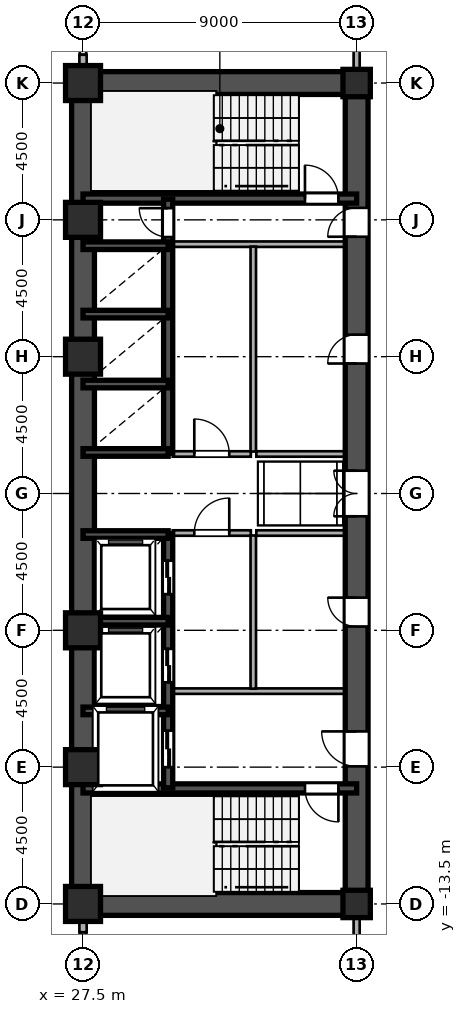
"""IFC4 building model, lengths in metres.
Left out: names, types, materials, properties, quantities, classifications, styles, units other than length and angle.
Written with IfcOpenShell. Run it as: python <this file> out.ifc"""

import sys

from ifc_helpers import new_model, si_unit, direction, frame, frame_2d, origin, origin_2d, place, context, subcontext, project, spatial, rectangle, hollow_rectangle, i_section, extrude, source, transform, mapped, element, fill, save


model = new_model("IFC4")
c1 = context("Model", 3, precision=1e-05, world=origin(), true_north=direction((0.0, 1.0)))
c2 = subcontext(c1, "Body", "Model", "MODEL_VIEW")
j1 = project(units=[si_unit("LENGTHUNIT", "METRE"), si_unit("PLANEANGLEUNIT", "RADIAN")], contexts=[c1])
p1 = place(None, origin())
s1 = spatial("IfcSite", under=j1, at=p1, CompositionType="ELEMENT")
p2 = place(p1, origin())
s2 = spatial("IfcBuilding", under=s1, at=p2, CompositionType="ELEMENT")
p3 = place(p2, frame((0.0, 0.0, 44.1)))
s3 = spatial("IfcBuildingStorey", under=s2, at=p3, CompositionType="ELEMENT", Elevation=44.1)
m1 = source(origin(), c2, "Body", "SweptSolid", [
    extrude(hollow_rectangle(XDim=1.15, YDim=1.15, WallThickness=0.048, at=origin_2d()), origin(), (0.0, 0.0, 1.0), 3.6),
])
for number, where, z_axis, x_axis in (
    (1, (27.5, -13.5, 0.0), (0.0, 0.0, 1.0), (1.0, 0.0, 0.0)),
    (2, (27.5, -9.0, 0.0), (0.0, 0.0, 1.0), (1.0, 0.0, 0.0)),
    (3, (27.5, -4.5, 0.0), (0.0, 0.0, 1.0), (1.0, 0.0, 0.0)),
    (4, (27.5, 4.5, 0.0), (0.0, 0.0, 1.0), (1.0, 0.0, 0.0)),
    (5, (27.5, 9.0, 0.0), (0.0, 0.0, 1.0), (1.0, 0.0, 0.0)),
    (6, (27.5, 13.5, 0.0), (0.0, 0.0, 1.0), (1.0, 0.0, 0.0)),
):
    element("IfcColumn", number, at=place(p3, frame(where, z_axis=z_axis, x_axis=x_axis)), inside=s3, PredefinedType="COLUMN", context=c2, shape_type="MappedRepresentation", body=[
        mapped(m1, transform((0.0, 0.0, 0.0), scale=1.0)),
    ])
m2 = source(origin(), c2, "Body", "SweptSolid", [
    extrude(i_section(OverallWidth=0.9, OverallDepth=0.9, WebThickness=0.036, FlangeThickness=0.055, at=origin_2d()), origin(), (0.0, 0.0, 1.0), 3.6),
])
for number, where, z_axis, x_axis in (
    (7, (36.5, -13.5, 0.0), (0.0, 0.0, 1.0), (1.0, 0.0, 0.0)),
    (8, (36.5, 13.5, 0.0), (0.0, 0.0, 1.0), (1.0, 0.0, 0.0)),
):
    element("IfcColumn", number, at=place(p3, frame(where, z_axis=z_axis, x_axis=x_axis)), inside=s3, PredefinedType="COLUMN", context=c2, shape_type="MappedRepresentation", body=[
        mapped(m2, transform((0.0, 0.0, 0.0), scale=1.0)),
    ])
for number, where, z_axis, x_axis in (
    (9, (27.5, -14.43, 0.0), (0.0, 0.0, 1.0), (0.0, 1.0, 0.0)),
    (10, (27.5, 13.88, 0.0), (0.0, 0.0, 1.0), (0.0, 1.0, 0.0)),
):
    element("IfcWall", number, at=place(p3, frame(where, z_axis=z_axis, x_axis=x_axis)), inside=s3, PredefinedType="SOLIDWALL", context=c2, shape_type="SweptSolid", body=[
        extrude(rectangle(XDim=0.55, YDim=0.24, at=frame_2d((0.275, 0.0))), origin(), (0.0, 0.0, 1.0), 2.88),
    ])
for number, where, z_axis, x_axis in (
    (11, (27.5, -13.5, 0.0), (0.0, 0.0, 1.0), (0.0, 1.0, 0.0)),
    (12, (27.5, 1.3, 0.0), (0.0, 0.0, 1.0), (0.0, 1.0, 0.0)),
):
    element("IfcWall", number, at=place(p3, frame(where, z_axis=z_axis, x_axis=x_axis)), inside=s3, PredefinedType="SHEAR", context=c2, shape_type="SweptSolid", body=[
        extrude(rectangle(XDim=12.2, YDim=0.75, at=frame_2d((6.1, 0.0))), origin(), (0.0, 0.0, 1.0), 3.38),
    ])
p4 = place(p3, frame((27.5, -1.3, 0.0), z_axis=(0.0, 0.0, 1.0), x_axis=(0.0, 1.0, 0.0)))
e13 = element("IfcWall", 13, at=p4, inside=s3, PredefinedType="SHEAR", context=c2, shape_type="SweptSolid", body=[
    extrude(rectangle(XDim=2.6, YDim=0.75, at=frame_2d((1.3, 0.0))), origin(), (0.0, 0.0, 1.0), 3.38),
])
for number, where, z_axis, x_axis in (
    (14, (27.5, -13.5, 0.0), (0.0, 0.0, 1.0), (1.0, 0.0, 0.0)),
    (15, (27.5, 13.5, 0.0), (0.0, 0.0, 1.0), (1.0, 0.0, 0.0)),
):
    element("IfcWall", number, at=place(p3, frame(where, z_axis=z_axis, x_axis=x_axis)), inside=s3, PredefinedType="SHEAR", context=c2, shape_type="SweptSolid", body=[
        extrude(rectangle(XDim=9.0, YDim=0.75, at=frame_2d((4.5, 0.0))), origin(), (0.0, 0.0, 1.0), 3.38),
    ])
p5 = place(p3, frame((36.5, -13.65, 0.0), z_axis=(0.0, 0.0, 1.0), x_axis=(0.0, 1.0, 0.0)))
e16 = element("IfcWall", 16, at=p5, inside=s3, PredefinedType="SHEAR", context=c2, shape_type="SweptSolid", body=[
    extrude(rectangle(XDim=7.15, YDim=0.75, at=frame_2d((3.575, 0.0))), origin(), (0.0, 0.0, 1.0), 3.38),
])
p6 = place(p5, frame((4.675, 0.0, 0.0)))
e17 = element("IfcOpeningElement", 17, at=p6, cuts=e16, PredefinedType="OPENING", context=c2, shape_type="SweptSolid", body=[
    extrude(rectangle(XDim=1.15, YDim=2.2, at=frame_2d((0.575, 1.1))), frame((0.0, 0.385, 0.0), z_axis=(0.0, -1.0, 0.0), x_axis=(1.0, 0.0, 0.0)), (0.0, 0.0, 1.0), 0.77),
])
p7 = place(p3, frame((36.5, -1.3, 0.0), z_axis=(0.0, 0.0, 1.0), x_axis=(0.0, 1.0, 0.0)))
e18 = element("IfcWall", 18, at=p7, inside=s3, PredefinedType="SHEAR", context=c2, shape_type="SweptSolid", body=[
    extrude(rectangle(XDim=2.6, YDim=0.75, at=frame_2d((1.3, 0.0))), origin(), (0.0, 0.0, 1.0), 3.38),
])
p8 = place(p7, frame((0.55, 0.0, 0.0)))
e19 = element("IfcOpeningElement", 19, at=p8, cuts=e18, PredefinedType="OPENING", context=c2, shape_type="SweptSolid", body=[
    extrude(rectangle(XDim=1.5, YDim=2.3, at=frame_2d((0.75, 1.15))), frame((0.0, 0.385, 0.0), z_axis=(0.0, -1.0, 0.0), x_axis=(1.0, 0.0, 0.0)), (0.0, 0.0, 1.0), 0.77),
])
p9 = place(p3, frame((36.5, 8.2, 0.0), z_axis=(0.0, 0.0, 1.0), x_axis=(0.0, 1.0, 0.0)))
e20 = element("IfcWall", 20, at=p9, inside=s3, PredefinedType="SHEAR", context=c2, shape_type="SweptSolid", body=[
    extrude(rectangle(XDim=5.45, YDim=0.75, at=frame_2d((2.725, 0.0))), origin(), (0.0, 0.0, 1.0), 3.38),
])
p10 = place(p9, frame((0.245, 0.0, 0.0)))
e21 = element("IfcOpeningElement", 21, at=p10, cuts=e20, PredefinedType="OPENING", context=c2, shape_type="SweptSolid", body=[
    extrude(rectangle(XDim=0.95, YDim=2.15, at=frame_2d((0.475, 1.075))), frame((0.0, 0.385, 0.0), z_axis=(0.0, -1.0, 0.0), x_axis=(1.0, 0.0, 0.0)), (0.0, 0.0, 1.0), 0.77),
])
p11 = place(p3, frame((36.5, -6.5, 0.0), z_axis=(0.0, 0.0, 1.0), x_axis=(0.0, 1.0, 0.0)))
e22 = element("IfcWall", 22, at=p11, inside=s3, PredefinedType="SHEAR", context=c2, shape_type="SweptSolid", body=[
    extrude(rectangle(XDim=5.2, YDim=0.75, at=frame_2d((2.6, 0.0))), origin(), (0.0, 0.0, 1.0), 3.38),
])
p12 = place(p11, frame((2.125, 0.0, 0.0)))
e23 = element("IfcOpeningElement", 23, at=p12, cuts=e22, PredefinedType="OPENING", context=c2, shape_type="SweptSolid", body=[
    extrude(rectangle(XDim=0.95, YDim=2.15, at=frame_2d((0.475, 1.075))), frame((0.0, 0.385, 0.0), z_axis=(0.0, -1.0, 0.0), x_axis=(1.0, 0.0, 0.0)), (0.0, 0.0, 1.0), 0.77),
])
p13 = place(p3, frame((36.5, 1.3, 0.0), z_axis=(0.0, 0.0, 1.0), x_axis=(0.0, 1.0, 0.0)))
e24 = element("IfcWall", 24, at=p13, inside=s3, PredefinedType="SHEAR", context=c2, shape_type="SweptSolid", body=[
    extrude(rectangle(XDim=6.9, YDim=0.75, at=frame_2d((3.45, 0.0))), origin(), (0.0, 0.0, 1.0), 3.38),
])
p14 = place(p13, frame((2.975, 0.0, 0.0)))
e25 = element("IfcOpeningElement", 25, at=p14, cuts=e24, PredefinedType="OPENING", context=c2, shape_type="SweptSolid", body=[
    extrude(rectangle(XDim=0.95, YDim=2.15, at=frame_2d((0.475, 1.075))), frame((0.0, 0.385, 0.0), z_axis=(0.0, -1.0, 0.0), x_axis=(1.0, 0.0, 0.0)), (0.0, 0.0, 1.0), 0.77),
])
p15 = place(p3, frame((27.5, -9.7, 0.0), z_axis=(0.0, 0.0, 1.0), x_axis=(1.0, 0.0, 0.0)))
e26 = element("IfcWall", 26, at=p15, inside=s3, PredefinedType="SHEAR", context=c2, shape_type="SweptSolid", body=[
    extrude(rectangle(XDim=9.0, YDim=0.3, at=frame_2d((4.5, 0.0))), origin(), (0.0, 0.0, 1.0), 3.38),
])
p16 = place(p15, frame((7.3, 0.0, 0.0)))
e27 = element("IfcOpeningElement", 27, at=p16, cuts=e26, PredefinedType="OPENING", context=c2, shape_type="SweptSolid", body=[
    extrude(rectangle(XDim=1.1, YDim=2.2, at=frame_2d((0.55, 1.1))), frame((0.0, 0.16, 0.0), z_axis=(0.0, -1.0, 0.0), x_axis=(1.0, 0.0, 0.0)), (0.0, 0.0, 1.0), 0.32),
])
p17 = place(p3, frame((27.5, 9.7, 0.0), z_axis=(0.0, 0.0, 1.0), x_axis=(1.0, 0.0, 0.0)))
e28 = element("IfcWall", 28, at=p17, inside=s3, PredefinedType="SHEAR", context=c2, shape_type="SweptSolid", body=[
    extrude(rectangle(XDim=9.0, YDim=0.3, at=frame_2d((4.5, 0.0))), origin(), (0.0, 0.0, 1.0), 3.38),
])
p18 = place(p17, frame((7.3, 0.0, 0.0)))
e29 = element("IfcOpeningElement", 29, at=p18, cuts=e28, PredefinedType="OPENING", context=c2, shape_type="SweptSolid", body=[
    extrude(rectangle(XDim=1.1, YDim=2.2, at=frame_2d((0.55, 1.1))), frame((0.0, 0.16, 0.0), z_axis=(0.0, -1.0, 0.0), x_axis=(1.0, 0.0, 0.0)), (0.0, 0.0, 1.0), 0.32),
])
for number, where, z_axis, x_axis in (
    (30, (27.5, -7.15, 0.0), (0.0, 0.0, 1.0), (1.0, 0.0, 0.0)),
    (31, (27.5, -4.2, 0.0), (0.0, 0.0, 1.0), (1.0, 0.0, 0.0)),
    (32, (27.5, -1.35, 0.0), (0.0, 0.0, 1.0), (1.0, 0.0, 0.0)),
    (33, (27.5, 1.35, 0.0), (0.0, 0.0, 1.0), (1.0, 0.0, 0.0)),
    (34, (27.5, 3.6, 0.0), (0.0, 0.0, 1.0), (1.0, 0.0, 0.0)),
    (35, (27.5, 5.9, 0.0), (0.0, 0.0, 1.0), (1.0, 0.0, 0.0)),
    (36, (27.5, 8.15, 0.0), (0.0, 0.0, 1.0), (1.0, 0.0, 0.0)),
):
    element("IfcWall", number, at=place(p3, frame(where, z_axis=z_axis, x_axis=x_axis)), inside=s3, PredefinedType="SHEAR", context=c2, shape_type="SweptSolid", body=[
        extrude(rectangle(XDim=2.8, YDim=0.25, at=frame_2d((1.4, 0.0))), origin(), (0.0, 0.0, 1.0), 3.38),
    ])
p19 = place(p3, frame((30.3, -9.68, 0.0), z_axis=(0.0, 0.0, 1.0), x_axis=(0.0, 1.0, 0.0)))
e37 = element("IfcWall", 37, at=p19, inside=s3, PredefinedType="SHEAR", context=c2, shape_type="SweptSolid", body=[
    extrude(rectangle(XDim=2.56, YDim=0.3, at=frame_2d((1.28, 0.0))), origin(), (0.0, 0.0, 1.0), 3.38),
])
p20 = place(p19, frame((0.68, 0.0, 0.0)))
e38 = element("IfcOpeningElement", 38, at=p20, cuts=e37, PredefinedType="OPENING", context=c2, shape_type="SweptSolid", body=[
    extrude(rectangle(XDim=1.2, YDim=2.25, at=frame_2d((0.6, 1.125))), frame((0.0, 0.16, 0.0), z_axis=(0.0, -1.0, 0.0), x_axis=(1.0, 0.0, 0.0)), (0.0, 0.0, 1.0), 0.32),
])
p21 = place(p3, frame((30.3, -7.12, 0.0), z_axis=(0.0, 0.0, 1.0), x_axis=(0.0, 1.0, 0.0)))
e39 = element("IfcWall", 39, at=p21, inside=s3, PredefinedType="SHEAR", context=c2, shape_type="SweptSolid", body=[
    extrude(rectangle(XDim=2.92, YDim=0.3, at=frame_2d((1.46, 0.0))), origin(), (0.0, 0.0, 1.0), 3.38),
])
p22 = place(p21, frame((0.91, 0.0, 0.0)))
e40 = element("IfcOpeningElement", 40, at=p22, cuts=e39, PredefinedType="OPENING", context=c2, shape_type="SweptSolid", body=[
    extrude(rectangle(XDim=1.1, YDim=2.2, at=frame_2d((0.55, 1.1))), frame((0.0, 0.16, 0.0), z_axis=(0.0, -1.0, 0.0), x_axis=(1.0, 0.0, 0.0)), (0.0, 0.0, 1.0), 0.32),
])
p23 = place(p3, frame((30.3, -4.2, 0.0), z_axis=(0.0, 0.0, 1.0), x_axis=(0.0, 1.0, 0.0)))
e41 = element("IfcWall", 41, at=p23, inside=s3, PredefinedType="SHEAR", context=c2, shape_type="SweptSolid", body=[
    extrude(rectangle(XDim=2.88, YDim=0.3, at=frame_2d((1.44, 0.0))), origin(), (0.0, 0.0, 1.0), 3.38),
])
p24 = place(p23, frame((0.89, 0.0, 0.0)))
e42 = element("IfcOpeningElement", 42, at=p24, cuts=e41, PredefinedType="OPENING", context=c2, shape_type="SweptSolid", body=[
    extrude(rectangle(XDim=1.1, YDim=2.2, at=frame_2d((0.55, 1.1))), frame((0.0, 0.16, 0.0), z_axis=(0.0, -1.0, 0.0), x_axis=(1.0, 0.0, 0.0)), (0.0, 0.0, 1.0), 0.32),
])
p25 = place(p3, frame((30.3, 1.32, 0.0), z_axis=(0.0, 0.0, 1.0), x_axis=(0.0, 1.0, 0.0)))
e43 = element("IfcWall", 43, at=p25, inside=s3, PredefinedType="SHEAR", context=c2, shape_type="SweptSolid", body=[
    extrude(rectangle(XDim=2.28, YDim=0.3, at=frame_2d((1.14, 0.0))), origin(), (0.0, 0.0, 1.0), 3.38),
])
p26 = place(p3, frame((30.3, 3.6, 0.0), z_axis=(0.0, 0.0, 1.0), x_axis=(0.0, 1.0, 0.0)))
e44 = element("IfcWall", 44, at=p26, inside=s3, PredefinedType="SHEAR", context=c2, shape_type="SweptSolid", body=[
    extrude(rectangle(XDim=2.3, YDim=0.3, at=frame_2d((1.15, 0.0))), origin(), (0.0, 0.0, 1.0), 3.38),
])
p27 = place(p3, frame((30.3, 5.9, 0.0), z_axis=(0.0, 0.0, 1.0), x_axis=(0.0, 1.0, 0.0)))
e45 = element("IfcWall", 45, at=p27, inside=s3, PredefinedType="SHEAR", context=c2, shape_type="SweptSolid", body=[
    extrude(rectangle(XDim=2.25, YDim=0.3, at=frame_2d((1.125, 0.0))), origin(), (0.0, 0.0, 1.0), 3.38),
])
p28 = place(p3, frame((30.3, 8.15, 0.0), z_axis=(0.0, 0.0, 1.0), x_axis=(0.0, 1.0, 0.0)))
e46 = element("IfcWall", 46, at=p28, inside=s3, PredefinedType="SHEAR", context=c2, shape_type="SweptSolid", body=[
    extrude(rectangle(XDim=1.53, YDim=0.3, at=frame_2d((0.765, 0.0))), origin(), (0.0, 0.0, 1.0), 3.38),
])
p29 = place(p28, frame((0.285, 0.0, 0.0)))
e47 = element("IfcOpeningElement", 47, at=p29, cuts=e46, PredefinedType="OPENING", context=c2, shape_type="SweptSolid", body=[
    extrude(rectangle(XDim=0.95, YDim=2.15, at=frame_2d((0.475, 1.075))), frame((0.0, 0.16, 0.0), z_axis=(0.0, -1.0, 0.0), x_axis=(1.0, 0.0, 0.0)), (0.0, 0.0, 1.0), 0.32),
])
for number, where, z_axis, x_axis in (
    (48, (30.45, -6.5, 0.0), (0.0, 0.0, 1.0), (1.0, 0.0, 0.0)),
    (49, (30.45, 8.2, 0.0), (0.0, 0.0, 1.0), (1.0, 0.0, 0.0)),
):
    element("IfcWall", number, at=place(p3, frame(where, z_axis=z_axis, x_axis=x_axis)), inside=s3, PredefinedType="PARTITIONING", context=c2, shape_type="SweptSolid", body=[
        extrude(rectangle(XDim=5.7, YDim=0.18, at=frame_2d((2.85, 0.0))), origin(), (0.0, 0.0, 1.0), 3.38),
    ])
p30 = place(p3, frame((33.1, -6.42, 0.0), z_axis=(0.0, 0.0, 1.0), x_axis=(0.0, 1.0, 0.0)))
e50 = element("IfcWall", 50, at=p30, inside=s3, PredefinedType="PARTITIONING", context=c2, shape_type="SweptSolid", body=[
    extrude(rectangle(XDim=5.04, YDim=0.18, at=frame_2d((2.52, 0.0))), origin(), (0.0, 0.0, 1.0), 3.38),
])
p31 = place(p3, frame((33.1, 1.38, 0.0), z_axis=(0.0, 0.0, 1.0), x_axis=(0.0, 1.0, 0.0)))
e51 = element("IfcWall", 51, at=p31, inside=s3, PredefinedType="PARTITIONING", context=c2, shape_type="SweptSolid", body=[
    extrude(rectangle(XDim=6.74, YDim=0.18, at=frame_2d((3.37, 0.0))), origin(), (0.0, 0.0, 1.0), 3.38),
])
p32 = place(p3, frame((30.45, -1.3, 0.0), z_axis=(0.0, 0.0, 1.0), x_axis=(1.0, 0.0, 0.0)))
e52 = element("IfcWall", 52, at=p32, inside=s3, PredefinedType="PARTITIONING", context=c2, shape_type="SweptSolid", body=[
    extrude(rectangle(XDim=2.57, YDim=0.18, at=frame_2d((1.285, 0.0))), origin(), (0.0, 0.0, 1.0), 3.38),
])
p33 = place(p32, frame((0.71, 0.0, 0.0)))
e53 = element("IfcOpeningElement", 53, at=p33, cuts=e52, PredefinedType="OPENING", context=c2, shape_type="SweptSolid", body=[
    extrude(rectangle(XDim=1.15, YDim=2.2, at=frame_2d((0.575, 1.1))), frame((0.0, 0.1, 0.0), z_axis=(0.0, -1.0, 0.0), x_axis=(1.0, 0.0, 0.0)), (0.0, 0.0, 1.0), 0.2),
])
p34 = place(p3, frame((30.45, 1.3, 0.0), z_axis=(0.0, 0.0, 1.0), x_axis=(1.0, 0.0, 0.0)))
e54 = element("IfcWall", 54, at=p34, inside=s3, PredefinedType="PARTITIONING", context=c2, shape_type="SweptSolid", body=[
    extrude(rectangle(XDim=2.57, YDim=0.18, at=frame_2d((1.285, 0.0))), origin(), (0.0, 0.0, 1.0), 3.38),
])
p35 = place(p34, frame((0.71, 0.0, 0.0)))
e55 = element("IfcOpeningElement", 55, at=p35, cuts=e54, PredefinedType="OPENING", context=c2, shape_type="SweptSolid", body=[
    extrude(rectangle(XDim=1.15, YDim=2.2, at=frame_2d((0.575, 1.1))), frame((0.0, 0.1, 0.0), z_axis=(0.0, -1.0, 0.0), x_axis=(1.0, 0.0, 0.0)), (0.0, 0.0, 1.0), 0.2),
])
for number, where, z_axis, x_axis in (
    (56, (33.2, -1.3, 0.0), (0.0, 0.0, 1.0), (1.0, 0.0, 0.0)),
    (57, (33.2, 1.3, 0.0), (0.0, 0.0, 1.0), (1.0, 0.0, 0.0)),
):
    element("IfcWall", number, at=place(p3, frame(where, z_axis=z_axis, x_axis=x_axis)), inside=s3, PredefinedType="PARTITIONING", context=c2, shape_type="SweptSolid", body=[
        extrude(rectangle(XDim=2.95, YDim=0.18, at=frame_2d((1.475, 0.0))), origin(), (0.0, 0.0, 1.0), 3.38),
    ])
for number, where, z_axis, x_axis in (
    (58, (36.5, -15.515, 0.0), (0.0, 0.0, 1.0), (0.0, 1.0, 0.0)),
    (59, (36.5, 13.88, 0.0), (0.0, 0.0, 1.0), (0.0, 1.0, 0.0)),
):
    element("IfcWall", number, at=place(p3, frame(where, z_axis=z_axis, x_axis=x_axis)), inside=s3, PredefinedType="PARTITIONING", context=c2, shape_type="SweptSolid", body=[
        extrude(rectangle(XDim=1.635, YDim=0.2, at=frame_2d((0.817, 0.0))), origin(), (0.0, 0.0, 1.0), 2.68),
    ])
m3 = source(origin(), c2, "Body", "SweptSolid", [
    extrude(rectangle(XDim=1.15, YDim=2.2, at=frame_2d((0.575, 1.1))), frame((0.0, 0.025, 0.0), z_axis=(0.0, -1.0, 0.0), x_axis=(1.0, 0.0, 0.0)), (0.0, 0.0, 1.0), 0.05),
])
p36 = place(p6, origin())
e60 = element("IfcDoor", 60, at=p36, inside=s3, OperationType="SINGLE_SWING_RIGHT", PredefinedType="DOOR", context=c2, shape_type="MappedRepresentation", body=[
    mapped(m3, transform((0.0, 0.0, 0.0), scale=1.0)),
])
fill(e17, e60)
m4 = source(origin(), c2, "Body", "SweptSolid", [
    extrude(rectangle(XDim=1.5, YDim=2.3, at=frame_2d((0.75, 1.15))), frame((0.0, 0.025, 0.0), z_axis=(0.0, -1.0, 0.0), x_axis=(1.0, 0.0, 0.0)), (0.0, 0.0, 1.0), 0.05),
])
p37 = place(p8, origin())
e61 = element("IfcDoor", 61, at=p37, inside=s3, OperationType="DOUBLE_SWING_LEFT", PredefinedType="DOOR", context=c2, shape_type="MappedRepresentation", body=[
    mapped(m4, transform((0.0, 0.0, 0.0), scale=1.0)),
])
fill(e19, e61)
m5 = source(origin(), c2, "Body", "SweptSolid", [
    extrude(rectangle(XDim=0.95, YDim=2.15, at=frame_2d((0.475, 1.075))), frame((0.0, 0.025, 0.0), z_axis=(0.0, -1.0, 0.0), x_axis=(1.0, 0.0, 0.0)), (0.0, 0.0, 1.0), 0.05),
])
p38 = place(p10, origin())
e62 = element("IfcDoor", 62, at=p38, inside=s3, OperationType="SINGLE_SWING_LEFT", PredefinedType="DOOR", context=c2, shape_type="MappedRepresentation", body=[
    mapped(m5, transform((0.0, 0.0, 0.0), scale=1.0)),
])
fill(e21, e62)
p39 = place(p12, origin())
e63 = element("IfcDoor", 63, at=p39, inside=s3, OperationType="SINGLE_SWING_RIGHT", PredefinedType="DOOR", context=c2, shape_type="MappedRepresentation", body=[
    mapped(m5, transform((0.0, 0.0, 0.0), scale=1.0)),
])
fill(e23, e63)
p40 = place(p14, origin())
e64 = element("IfcDoor", 64, at=p40, inside=s3, OperationType="SINGLE_SWING_LEFT", PredefinedType="DOOR", context=c2, shape_type="MappedRepresentation", body=[
    mapped(m5, transform((0.0, 0.0, 0.0), scale=1.0)),
])
fill(e25, e64)
m6 = source(origin(), c2, "Body", "SweptSolid", [
    extrude(rectangle(XDim=1.1, YDim=2.2, at=frame_2d((0.55, 1.1))), frame((0.0, 0.025, 0.0), z_axis=(0.0, -1.0, 0.0), x_axis=(1.0, 0.0, 0.0)), (0.0, 0.0, 1.0), 0.05),
])
p41 = place(p16, frame((1.1, 0.0, 0.0), z_axis=(0.0, 0.0, 1.0), x_axis=(-1.0, 0.0, 0.0)))
e65 = element("IfcDoor", 65, at=p41, inside=s3, OperationType="SINGLE_SWING_RIGHT", PredefinedType="DOOR", context=c2, shape_type="MappedRepresentation", body=[
    mapped(m6, transform((0.0, 0.0, 0.0), scale=1.0)),
])
fill(e27, e65)
p42 = place(p18, origin())
e66 = element("IfcDoor", 66, at=p42, inside=s3, OperationType="SINGLE_SWING_LEFT", PredefinedType="DOOR", context=c2, shape_type="MappedRepresentation", body=[
    mapped(m6, transform((0.0, 0.0, 0.0), scale=1.0)),
])
fill(e29, e66)
m7 = source(origin(), c2, "Body", "SweptSolid", [
    extrude(rectangle(XDim=1.2, YDim=2.25, at=frame_2d((0.6, 1.125))), frame((0.0, 0.025, 0.0), z_axis=(0.0, -1.0, 0.0), x_axis=(1.0, 0.0, 0.0)), (0.0, 0.0, 1.0), 0.05),
])
p43 = place(p20, origin())
e67 = element("IfcDoor", 67, at=p43, inside=s3, OperationType="DOUBLE_DOOR_SLIDING", PredefinedType="DOOR", context=c2, shape_type="MappedRepresentation", body=[
    mapped(m7, transform((0.0, 0.0, 0.0), scale=1.0)),
])
fill(e38, e67)
m8 = source(origin(), c2, "Body", "SweptSolid", [
    extrude(rectangle(XDim=1.1, YDim=2.2, at=frame_2d((0.55, 1.1))), frame((0.0, 0.025, 0.0), z_axis=(0.0, -1.0, 0.0), x_axis=(1.0, 0.0, 0.0)), (0.0, 0.0, 1.0), 0.05),
])
p44 = place(p22, origin())
e68 = element("IfcDoor", 68, at=p44, inside=s3, OperationType="DOUBLE_DOOR_SLIDING", PredefinedType="DOOR", context=c2, shape_type="MappedRepresentation", body=[
    mapped(m8, transform((0.0, 0.0, 0.0), scale=1.0)),
])
fill(e40, e68)
p45 = place(p24, origin())
e69 = element("IfcDoor", 69, at=p45, inside=s3, OperationType="DOUBLE_DOOR_SLIDING", PredefinedType="DOOR", context=c2, shape_type="MappedRepresentation", body=[
    mapped(m8, transform((0.0, 0.0, 0.0), scale=1.0)),
])
fill(e42, e69)
p46 = place(p29, origin())
e70 = element("IfcDoor", 70, at=p46, inside=s3, OperationType="SINGLE_SWING_RIGHT", PredefinedType="DOOR", context=c2, shape_type="MappedRepresentation", body=[
    mapped(m5, transform((0.0, 0.0, 0.0), scale=1.0)),
])
fill(e47, e70)
p47 = place(p33, origin())
e71 = element("IfcDoor", 71, at=p47, inside=s3, OperationType="SINGLE_SWING_RIGHT", PredefinedType="DOOR", context=c2, shape_type="MappedRepresentation", body=[
    mapped(m3, transform((0.0, 0.0, 0.0), scale=1.0)),
])
fill(e53, e71)
p48 = place(p35, origin())
e72 = element("IfcDoor", 72, at=p48, inside=s3, OperationType="SINGLE_SWING_LEFT", PredefinedType="DOOR", context=c2, shape_type="MappedRepresentation", body=[
    mapped(m3, transform((0.0, 0.0, 0.0), scale=1.0)),
])
fill(e55, e72)
save(model, sys.argv[1])
